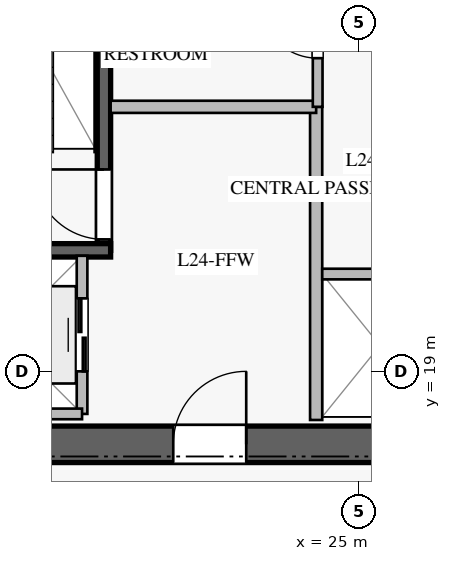
"""IFC4 building model, lengths in metres.
Left out: names, types, materials, properties, quantities, classifications, styles, units other than length and angle.
Written with IfcOpenShell. Run it as: python <this file> out.ifc"""

import sys

from ifc_helpers import new_model, si_unit, direction, frame, frame_2d, origin, place, context, subcontext, project, spatial, rectangle, extrude, element, fill, save


model = new_model("IFC4")
c1 = context("Model", 3, precision=1e-05, world=origin(), true_north=direction((0.0, 1.0)))
c2 = subcontext(c1, "Body", "Model", "MODEL_VIEW")
j1 = project(units=[si_unit("LENGTHUNIT", "METRE"), si_unit("PLANEANGLEUNIT", "RADIAN")], contexts=[c1])
p1 = place(None, origin())
s1 = spatial("IfcSite", under=j1, at=p1, CompositionType="ELEMENT")
p2 = place(p1, origin())
s2 = spatial("IfcBuilding", under=s1, at=p2, CompositionType="ELEMENT")
p3 = place(p2, frame((0.0, 0.0, 102.4)))
s3 = spatial("IfcBuildingStorey", under=s2, at=p3, CompositionType="ELEMENT", Elevation=102.4)
p4 = place(p3, frame((16.9, 17.8, 0.0), z_axis=(0.0, 0.0, 1.0), x_axis=(1.0, 0.0, 0.0)))
e1 = element("IfcWall", 1, at=p4, inside=s3, PredefinedType="SHEAR", context=c2, shape_type="SweptSolid", body=[
    extrude(rectangle(XDim=16.2, YDim=0.6, at=frame_2d((8.1, 0.0))), origin(), (0.0, 0.0, 1.0), 3.76),
])
p5 = place(p4, frame((5.05, 0.0, 0.0)))
e2 = element("IfcOpeningElement", 2, at=p5, cuts=e1, PredefinedType="OPENING", context=c2, shape_type="SweptSolid", body=[
    extrude(rectangle(XDim=1.2, YDim=2.25, at=frame_2d((0.6, 1.125))), frame((0.0, 0.31, 0.0), z_axis=(0.0, -1.0, 0.0), x_axis=(1.0, 0.0, 0.0)), (0.0, 0.0, 1.0), 0.62),
])
p6 = place(p4, frame((14.0, 0.0, 0.0)))
e3 = element("IfcOpeningElement", 3, at=p6, cuts=e1, PredefinedType="OPENING", context=c2, shape_type="SweptSolid", body=[
    extrude(rectangle(XDim=0.9, YDim=2.1, at=frame_2d((0.45, 1.05))), frame((0.0, 0.31, 0.0), z_axis=(0.0, -1.0, 0.0), x_axis=(1.0, 0.0, 0.0)), (0.0, 0.0, 1.0), 0.62),
])
p7 = place(p3, frame((20.81, 20.99, 0.0), z_axis=(0.0, 0.0, 1.0), x_axis=(0.0, 1.0, 0.0)))
e4 = element("IfcWall", 4, at=p7, inside=s3, PredefinedType="SOLIDWALL", context=c2, shape_type="SweptSolid", body=[
    extrude(rectangle(XDim=7.22, YDim=0.22, at=frame_2d((3.61, 0.0))), origin(), (0.0, 0.0, 1.0), 3.76),
])
p8 = place(p7, frame((0.18, 0.0, 0.0)))
e5 = element("IfcOpeningElement", 5, at=p8, cuts=e4, PredefinedType="OPENING", context=c2, shape_type="SweptSolid", body=[
    extrude(rectangle(XDim=1.15, YDim=2.2, at=frame_2d((0.575, 1.1))), frame((0.0, 0.12, 0.0), z_axis=(0.0, -1.0, 0.0), x_axis=(1.0, 0.0, 0.0)), (0.0, 0.0, 1.0), 0.24),
])
p9 = place(p3, frame((17.2, 20.99, 0.0), z_axis=(0.0, 0.0, 1.0), x_axis=(1.0, 0.0, 0.0)))
e6 = element("IfcWall", 6, at=p9, inside=s3, PredefinedType="SOLIDWALL", context=c2, shape_type="SweptSolid", body=[
    extrude(rectangle(XDim=3.72, YDim=0.22, at=frame_2d((1.86, 0.0))), origin(), (0.0, 0.0, 1.0), 3.76),
])
p10 = place(p3, frame((24.3, 18.2, 0.0), z_axis=(0.0, 0.0, 1.0), x_axis=(0.0, 1.0, 0.0)))
e7 = element("IfcWall", 7, at=p10, inside=s3, PredefinedType="PARTITIONING", context=c2, shape_type="SweptSolid", body=[
    extrude(rectangle(XDim=5.15, YDim=0.2, at=frame_2d((2.575, 0.0))), origin(), (0.0, 0.0, 1.0), 3.76),
])
p11 = place(p3, frame((20.92, 23.35, 0.0), z_axis=(0.0, 0.0, 1.0), x_axis=(1.0, 0.0, 0.0)))
e8 = element("IfcWall", 8, at=p11, inside=s3, PredefinedType="PARTITIONING", context=c2, shape_type="SweptSolid", body=[
    extrude(rectangle(XDim=3.38, YDim=0.2, at=frame_2d((1.69, 0.0))), origin(), (0.0, 0.0, 1.0), 3.76),
])
p12 = place(p3, frame((24.325, 23.35, 0.0), z_axis=(0.0, 0.0, 1.0), x_axis=(0.0, 1.0, 0.0)))
e9 = element("IfcWall", 9, at=p12, inside=s3, PredefinedType="PLUMBINGWALL", context=c2, shape_type="SweptSolid", body=[
    extrude(rectangle(XDim=4.93, YDim=0.16, at=frame_2d((2.465, 0.0))), origin(), (0.0, 0.0, 1.0), 3.76),
])
p13 = place(p12, frame((0.8, 0.0, 0.0)))
e10 = element("IfcOpeningElement", 10, at=p13, cuts=e9, PredefinedType="OPENING", context=c2, shape_type="SweptSolid", body=[
    extrude(rectangle(XDim=0.95, YDim=2.1, at=frame_2d((0.475, 1.05))), frame((0.0, 0.09, 0.0), z_axis=(0.0, -1.0, 0.0), x_axis=(1.0, 0.0, 0.0)), (0.0, 0.0, 1.0), 0.18),
])
p14 = place(p12, frame((3.26, 0.0, 0.0)))
e11 = element("IfcOpeningElement", 11, at=p14, cuts=e9, PredefinedType="OPENING", context=c2, shape_type="SweptSolid", body=[
    extrude(rectangle(XDim=0.9, YDim=2.1, at=frame_2d((0.45, 1.05))), frame((0.0, 0.09, 0.0), z_axis=(0.0, -1.0, 0.0), x_axis=(1.0, 0.0, 0.0)), (0.0, 0.0, 1.0), 0.18),
])
p15 = place(p3, frame((24.4, 20.6, 0.0), z_axis=(0.0, 0.0, 1.0), x_axis=(1.0, 0.0, 0.0)))
e12 = element("IfcWall", 12, at=p15, inside=s3, PredefinedType="PARTITIONING", context=c2, shape_type="SweptSolid", body=[
    extrude(rectangle(XDim=1.9, YDim=0.175, at=frame_2d((0.95, 0.0))), origin(), (0.0, 0.0, 1.0), 3.76),
])
p16 = place(p3, frame((20.45, 18.3, 0.0), z_axis=(0.0, 0.0, 1.0), x_axis=(0.0, 1.0, 0.0)))
e13 = element("IfcWall", 13, at=p16, inside=s3, PredefinedType="PARTITIONING", context=c2, shape_type="SweptSolid", body=[
    extrude(rectangle(XDim=2.6, YDim=0.175, at=frame_2d((1.3, 0.0))), origin(), (0.0, 0.0, 1.0), 3.76),
])
p17 = place(p16, frame((0.7, 0.0, 0.0)))
e14 = element("IfcOpeningElement", 14, at=p17, cuts=e13, PredefinedType="OPENING", context=c2, shape_type="SweptSolid", body=[
    extrude(rectangle(XDim=1.2, YDim=2.2, at=frame_2d((0.6, 1.1))), frame((0.0, 0.098, 0.0), z_axis=(0.0, -1.0, 0.0), x_axis=(1.0, 0.0, 0.0)), (0.0, 0.0, 1.0), 0.195),
])
p18 = place(p3, frame((17.85, 18.3, 0.0), z_axis=(0.0, 0.0, 1.0), x_axis=(1.0, 0.0, 0.0)))
e15 = element("IfcWall", 15, at=p18, inside=s3, PredefinedType="PARTITIONING", context=c2, shape_type="SweptSolid", body=[
    extrude(rectangle(XDim=2.6, YDim=0.175, at=frame_2d((1.3, 0.0))), origin(), (0.0, 0.0, 1.0), 3.76),
])
p19 = place(p8, origin())
e16 = element("IfcDoor", 16, at=p19, inside=s3, OperationType="SINGLE_SWING_RIGHT", PredefinedType="DOOR", context=c2, shape_type="SweptSolid", body=[
    extrude(rectangle(XDim=1.15, YDim=2.2, at=frame_2d((0.575, 1.1))), frame((0.0, 0.025, 0.0), z_axis=(0.0, -1.0, 0.0), x_axis=(1.0, 0.0, 0.0)), (0.0, 0.0, 1.0), 0.05),
])
fill(e5, e16)
p20 = place(p5, origin())
e17 = element("IfcDoor", 17, at=p20, inside=s3, OperationType="SINGLE_SWING_RIGHT", PredefinedType="DOOR", context=c2, shape_type="SweptSolid", body=[
    extrude(rectangle(XDim=1.2, YDim=2.25, at=frame_2d((0.6, 1.125))), frame((0.0, 0.025, 0.0), z_axis=(0.0, -1.0, 0.0), x_axis=(1.0, 0.0, 0.0)), (0.0, 0.0, 1.0), 0.05),
])
fill(e2, e17)
p21 = place(p13, origin())
e18 = element("IfcDoor", 18, at=p21, inside=s3, OperationType="SINGLE_SWING_RIGHT", PredefinedType="DOOR", context=c2, shape_type="SweptSolid", body=[
    extrude(rectangle(XDim=0.95, YDim=2.1, at=frame_2d((0.475, 1.05))), frame((0.0, 0.025, 0.0), z_axis=(0.0, -1.0, 0.0), x_axis=(1.0, 0.0, 0.0)), (0.0, 0.0, 1.0), 0.05),
])
fill(e10, e18)
p22 = place(p17, origin())
e19 = element("IfcDoor", 19, at=p22, inside=s3, OperationType="DOUBLE_DOOR_SLIDING", PredefinedType="DOOR", context=c2, shape_type="SweptSolid", body=[
    extrude(rectangle(XDim=1.2, YDim=2.2, at=frame_2d((0.6, 1.1))), frame((0.0, 0.025, 0.0), z_axis=(0.0, -1.0, 0.0), x_axis=(1.0, 0.0, 0.0)), (0.0, 0.0, 1.0), 0.05),
])
fill(e14, e19)
save(model, sys.argv[1])
